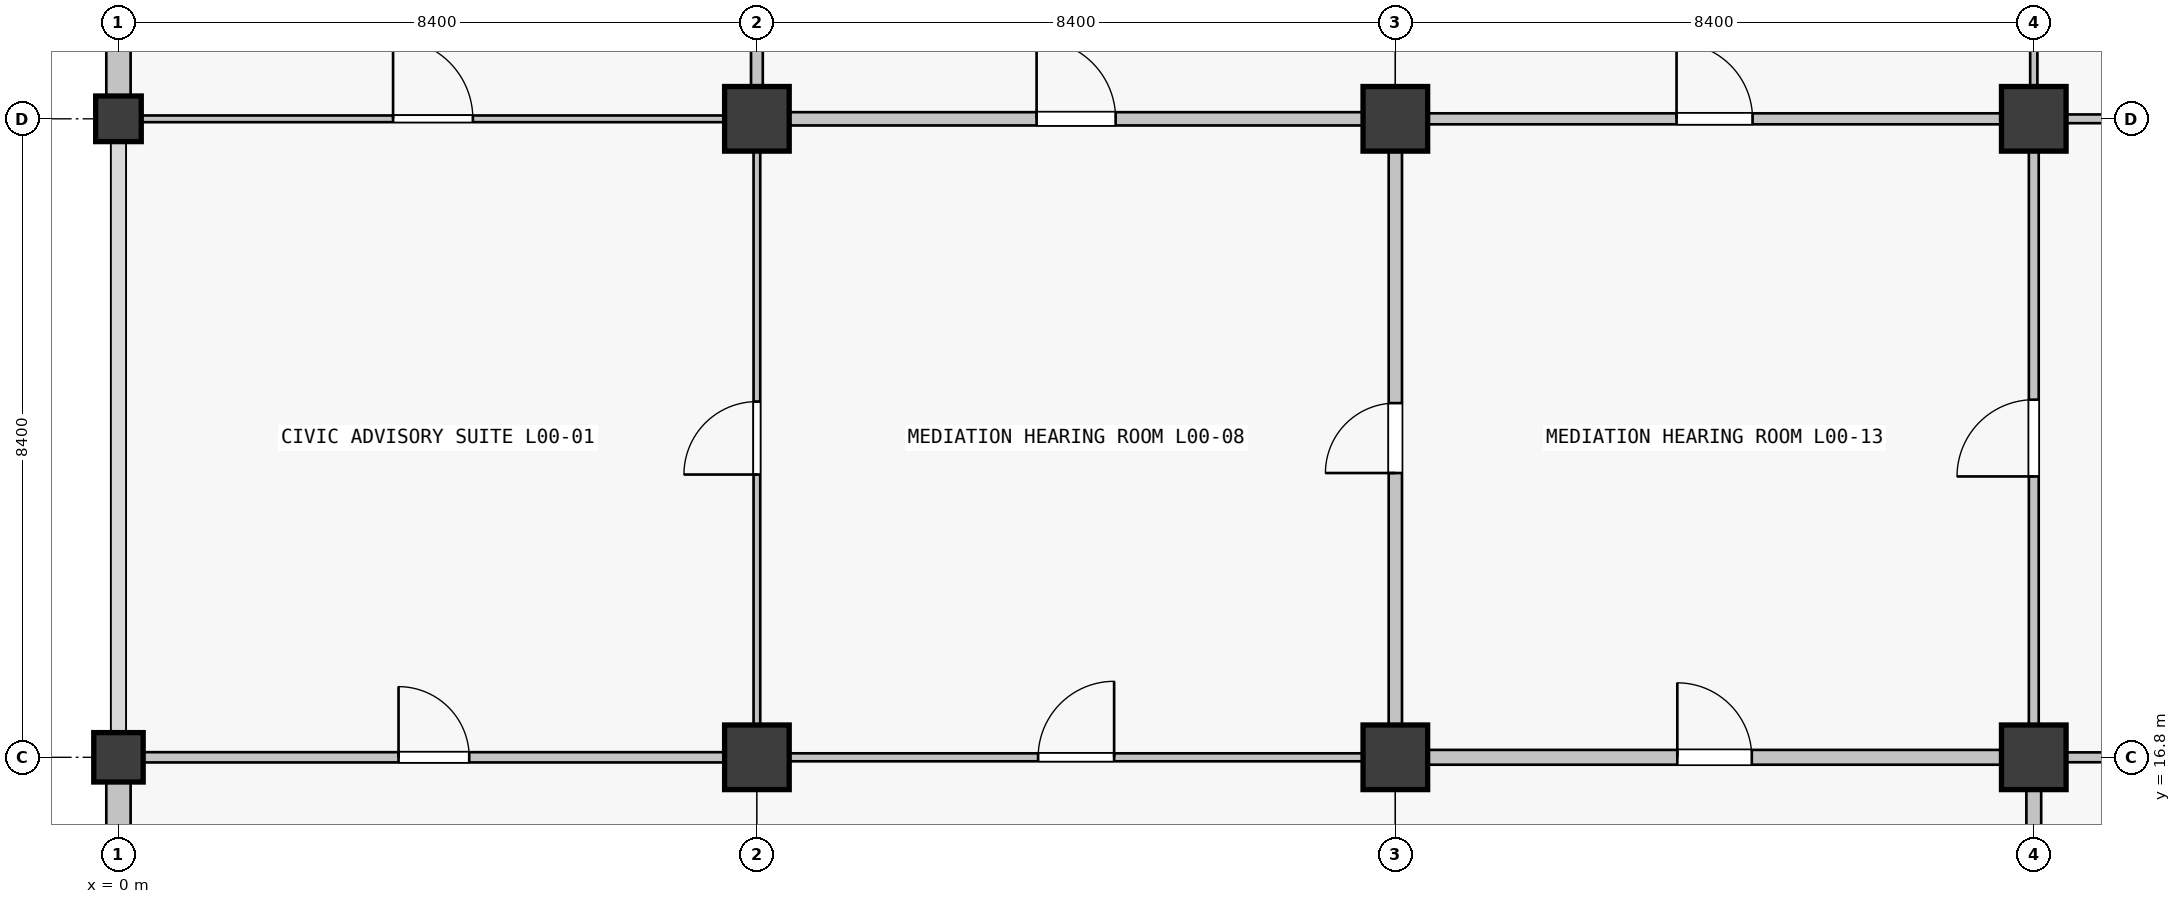
"""IFC4 building model, lengths in metres.
Left out: names, types, materials, properties, quantities, classifications, styles, units other than length and angle.
Written with IfcOpenShell. Run it as: python <this file> out.ifc"""

import sys

from ifc_helpers import new_model, si_unit, direction, frame, frame_2d, origin, origin_2d, place, context, subcontext, project, spatial, rectangle, extrude, element, fill, save


model = new_model("IFC4")
c1 = context("Model", 3, precision=1e-05, world=origin(), true_north=direction((0.0, 1.0)))
c2 = subcontext(c1, "Body", "Model", "MODEL_VIEW")
j1 = project(units=[si_unit("LENGTHUNIT", "METRE"), si_unit("PLANEANGLEUNIT", "RADIAN")], contexts=[c1])
p1 = place(None, origin())
s1 = spatial("IfcSite", under=j1, at=p1, CompositionType="ELEMENT")
p2 = place(p1, origin())
s2 = spatial("IfcBuilding", under=s1, at=p2, CompositionType="ELEMENT")
p3 = place(p2, origin())
s3 = spatial("IfcBuildingStorey", under=s2, at=p3, CompositionType="ELEMENT", Elevation=0.0)
p4 = place(p3, frame((0.0, 16.8, 0.0), z_axis=(0.0, 0.0, 1.0), x_axis=(1.0, 0.0, 0.0)))
e1 = element("IfcColumn", 1, at=p4, inside=s3, PredefinedType="COLUMN", context=c2, shape_type="SweptSolid", body=[
    extrude(rectangle(XDim=0.65, YDim=0.65, at=origin_2d()), origin(), (0.0, 0.0, 1.0), 5.76),
])
p5 = place(p3, frame((0.0, 25.2, 0.0), z_axis=(0.0, 0.0, 1.0), x_axis=(1.0, 0.0, 0.0)))
e2 = element("IfcColumn", 2, at=p5, inside=s3, PredefinedType="COLUMN", context=c2, shape_type="SweptSolid", body=[
    extrude(rectangle(XDim=0.6, YDim=0.6, at=origin_2d()), origin(), (0.0, 0.0, 1.0), 5.76),
])
for number, where, z_axis, x_axis in (
    (3, (8.4, 16.8, 0.0), (0.0, 0.0, 1.0), (1.0, 0.0, 0.0)),
    (4, (8.4, 25.2, 0.0), (0.0, 0.0, 1.0), (1.0, 0.0, 0.0)),
    (5, (16.8, 16.8, 0.0), (0.0, 0.0, 1.0), (1.0, 0.0, 0.0)),
    (6, (16.8, 25.2, 0.0), (0.0, 0.0, 1.0), (1.0, 0.0, 0.0)),
    (7, (25.2, 16.8, 0.0), (0.0, 0.0, 1.0), (1.0, 0.0, 0.0)),
    (8, (25.2, 25.2, 0.0), (0.0, 0.0, 1.0), (1.0, 0.0, 0.0)),
):
    element("IfcColumn", number, at=place(p3, frame(where, z_axis=z_axis, x_axis=x_axis)), inside=s3, PredefinedType="COLUMN", context=c2, shape_type="SweptSolid", body=[
        extrude(rectangle(XDim=0.85, YDim=0.85, at=origin_2d()), origin(), (0.0, 0.0, 1.0), 5.76),
    ])
p6 = place(p3, frame((0.0, 8.701, 0.0), z_axis=(0.0, 0.0, 1.0), x_axis=(0.0, 1.0, 0.0)))
e9 = element("IfcWall", 9, at=p6, inside=s3, PredefinedType="SOLIDWALL", context=c2, shape_type="SweptSolid", body=[
    extrude(rectangle(XDim=7.773, YDim=0.32, at=frame_2d((3.887, 0.0))), origin(), (0.0, 0.0, 1.0), 4.7),
])
p7 = place(p6, frame((2.837, 0.0, 0.9)))
e10 = element("IfcOpeningElement", 10, at=p7, cuts=e9, PredefinedType="OPENING", context=c2, shape_type="SweptSolid", body=[
    extrude(rectangle(XDim=2.1, YDim=1.8, at=frame_2d((1.05, 0.9))), frame((0.0, 0.16, 0.0), z_axis=(0.0, -1.0, 0.0), x_axis=(1.0, 0.0, 0.0)), (0.0, 0.0, 1.0), 0.32),
])
p8 = place(p3, frame((0.0, 25.501, 0.0), z_axis=(0.0, 0.0, 1.0), x_axis=(0.0, 1.0, 0.0)))
e11 = element("IfcWall", 11, at=p8, inside=s3, PredefinedType="SOLIDWALL", context=c2, shape_type="SweptSolid", body=[
    extrude(rectangle(XDim=7.773, YDim=0.32, at=frame_2d((3.886, 0.0))), origin(), (0.0, 0.0, 1.0), 4.7),
])
p9 = place(p8, frame((2.786, 0.0, 0.0)))
e12 = element("IfcOpeningElement", 12, at=p9, cuts=e11, PredefinedType="OPENING", context=c2, shape_type="SweptSolid", body=[
    extrude(rectangle(XDim=2.2, YDim=2.3, at=frame_2d((1.1, 1.15))), frame((0.0, 0.16, 0.0), z_axis=(0.0, -1.0, 0.0), x_axis=(1.0, 0.0, 0.0)), (0.0, 0.0, 1.0), 0.32),
])
p10 = place(p3, frame((0.327, 16.8, 0.0), z_axis=(0.0, 0.0, 1.0), x_axis=(1.0, 0.0, 0.0)))
e13 = element("IfcWall", 13, at=p10, inside=s3, PredefinedType="PARTITIONING", context=c2, shape_type="SweptSolid", body=[
    extrude(rectangle(XDim=7.646, YDim=0.135, at=frame_2d((3.823, 0.0))), origin(), (0.0, 0.0, 1.0), 3.66),
])
p11 = place(p10, frame((3.358, 0.0, 0.0)))
e14 = element("IfcOpeningElement", 14, at=p11, cuts=e13, PredefinedType="OPENING", context=c2, shape_type="SweptSolid", body=[
    extrude(rectangle(XDim=0.93, YDim=2.12, at=frame_2d((0.465, 1.06))), frame((0.0, 0.067, 0.0), z_axis=(0.0, -1.0, 0.0), x_axis=(1.0, 0.0, 0.0)), (0.0, 0.0, 1.0), 0.135),
])
p12 = place(p3, frame((0.302, 25.2, 0.0), z_axis=(0.0, 0.0, 1.0), x_axis=(1.0, 0.0, 0.0)))
e15 = element("IfcWall", 15, at=p12, inside=s3, PredefinedType="PARTITIONING", context=c2, shape_type="SweptSolid", body=[
    extrude(rectangle(XDim=7.671, YDim=0.088, at=frame_2d((3.835, 0.0))), origin(), (0.0, 0.0, 1.0), 3.66),
])
p13 = place(p12, frame((3.311, 0.0, 0.0)))
e16 = element("IfcOpeningElement", 16, at=p13, cuts=e15, PredefinedType="OPENING", context=c2, shape_type="SweptSolid", body=[
    extrude(rectangle(XDim=1.05, YDim=2.12, at=frame_2d((0.525, 1.06))), frame((0.0, 0.044, 0.0), z_axis=(0.0, -1.0, 0.0), x_axis=(1.0, 0.0, 0.0)), (0.0, 0.0, 1.0), 0.088),
])
p14 = place(p3, frame((8.827, 16.8, 0.0), z_axis=(0.0, 0.0, 1.0), x_axis=(1.0, 0.0, 0.0)))
e17 = element("IfcWall", 17, at=p14, inside=s3, PredefinedType="PARTITIONING", context=c2, shape_type="SweptSolid", body=[
    extrude(rectangle(XDim=7.546, YDim=0.105, at=frame_2d((3.773, 0.0))), origin(), (0.0, 0.0, 1.0), 3.66),
])
p15 = place(p14, frame((3.273, 0.0, 0.0)))
e18 = element("IfcOpeningElement", 18, at=p15, cuts=e17, PredefinedType="OPENING", context=c2, shape_type="SweptSolid", body=[
    extrude(rectangle(XDim=1.0, YDim=2.2, at=frame_2d((0.5, 1.1))), frame((0.0, 0.052, 0.0), z_axis=(0.0, -1.0, 0.0), x_axis=(1.0, 0.0, 0.0)), (0.0, 0.0, 1.0), 0.105),
])
p16 = place(p3, frame((8.827, 25.2, 0.0), z_axis=(0.0, 0.0, 1.0), x_axis=(1.0, 0.0, 0.0)))
e19 = element("IfcWall", 19, at=p16, inside=s3, PredefinedType="PARTITIONING", context=c2, shape_type="SweptSolid", body=[
    extrude(rectangle(XDim=7.546, YDim=0.175, at=frame_2d((3.773, 0.0))), origin(), (0.0, 0.0, 1.0), 3.66),
])
p17 = place(p16, frame((3.253, 0.0, 0.0)))
e20 = element("IfcOpeningElement", 20, at=p17, cuts=e19, PredefinedType="OPENING", context=c2, shape_type="SweptSolid", body=[
    extrude(rectangle(XDim=1.04, YDim=2.2, at=frame_2d((0.52, 1.1))), frame((0.0, 0.087, 0.0), z_axis=(0.0, -1.0, 0.0), x_axis=(1.0, 0.0, 0.0)), (0.0, 0.0, 1.0), 0.175),
])
p18 = place(p3, frame((17.227, 16.8, 0.0), z_axis=(0.0, 0.0, 1.0), x_axis=(1.0, 0.0, 0.0)))
e21 = element("IfcWall", 21, at=p18, inside=s3, PredefinedType="PARTITIONING", context=c2, shape_type="SweptSolid", body=[
    extrude(rectangle(XDim=7.546, YDim=0.195, at=frame_2d((3.773, 0.0))), origin(), (0.0, 0.0, 1.0), 3.66),
])
p19 = place(p18, frame((3.283, 0.0, 0.0)))
e22 = element("IfcOpeningElement", 22, at=p19, cuts=e21, PredefinedType="OPENING", context=c2, shape_type="SweptSolid", body=[
    extrude(rectangle(XDim=0.98, YDim=2.18, at=frame_2d((0.49, 1.09))), frame((0.0, 0.098, 0.0), z_axis=(0.0, -1.0, 0.0), x_axis=(1.0, 0.0, 0.0)), (0.0, 0.0, 1.0), 0.195),
])
p20 = place(p3, frame((17.227, 25.2, 0.0), z_axis=(0.0, 0.0, 1.0), x_axis=(1.0, 0.0, 0.0)))
e23 = element("IfcWall", 23, at=p20, inside=s3, PredefinedType="PARTITIONING", context=c2, shape_type="SweptSolid", body=[
    extrude(rectangle(XDim=7.546, YDim=0.145, at=frame_2d((3.773, 0.0))), origin(), (0.0, 0.0, 1.0), 3.66),
])
p21 = place(p20, frame((3.273, 0.0, 0.0)))
e24 = element("IfcOpeningElement", 24, at=p21, cuts=e23, PredefinedType="OPENING", context=c2, shape_type="SweptSolid", body=[
    extrude(rectangle(XDim=1.0, YDim=2.2, at=frame_2d((0.5, 1.1))), frame((0.0, 0.073, 0.0), z_axis=(0.0, -1.0, 0.0), x_axis=(1.0, 0.0, 0.0)), (0.0, 0.0, 1.0), 0.145),
])
p22 = place(p3, frame((25.627, 16.8, 0.0), z_axis=(0.0, 0.0, 1.0), x_axis=(1.0, 0.0, 0.0)))
e25 = element("IfcWall", 25, at=p22, inside=s3, PredefinedType="MOVABLE", context=c2, shape_type="SweptSolid", body=[
    extrude(rectangle(XDim=7.546, YDim=0.13, at=frame_2d((3.773, 0.0))), origin(), (0.0, 0.0, 1.0), 3.66),
])
p23 = place(p22, frame((3.303, 0.0, 0.0)))
e26 = element("IfcOpeningElement", 26, at=p23, cuts=e25, PredefinedType="OPENING", context=c2, shape_type="SweptSolid", body=[
    extrude(rectangle(XDim=0.94, YDim=2.15, at=frame_2d((0.47, 1.075))), frame((0.0, 0.065, 0.0), z_axis=(0.0, -1.0, 0.0), x_axis=(1.0, 0.0, 0.0)), (0.0, 0.0, 1.0), 0.13),
])
p24 = place(p3, frame((25.627, 25.2, 0.0), z_axis=(0.0, 0.0, 1.0), x_axis=(1.0, 0.0, 0.0)))
e27 = element("IfcWall", 27, at=p24, inside=s3, PredefinedType="PARTITIONING", context=c2, shape_type="SweptSolid", body=[
    extrude(rectangle(XDim=7.546, YDim=0.115, at=frame_2d((3.773, 0.0))), origin(), (0.0, 0.0, 1.0), 3.66),
])
p25 = place(p24, frame((3.288, 0.0, 0.0)))
e28 = element("IfcOpeningElement", 28, at=p25, cuts=e27, PredefinedType="OPENING", context=c2, shape_type="SweptSolid", body=[
    extrude(rectangle(XDim=0.97, YDim=2.12, at=frame_2d((0.485, 1.06))), frame((0.0, 0.058, 0.0), z_axis=(0.0, -1.0, 0.0), x_axis=(1.0, 0.0, 0.0)), (0.0, 0.0, 1.0), 0.115),
])
p26 = place(p3, frame((8.4, 17.227, 0.0), z_axis=(0.0, 0.0, 1.0), x_axis=(0.0, 1.0, 0.0)))
e29 = element("IfcWall", 29, at=p26, inside=s3, PredefinedType="PARTITIONING", context=c2, shape_type="SweptSolid", body=[
    extrude(rectangle(XDim=7.546, YDim=0.088, at=frame_2d((3.773, 0.0))), origin(), (0.0, 0.0, 1.0), 3.66),
])
p27 = place(p26, frame((3.293, 0.0, 0.0)))
e30 = element("IfcOpeningElement", 30, at=p27, cuts=e29, PredefinedType="OPENING", context=c2, shape_type="SweptSolid", body=[
    extrude(rectangle(XDim=0.96, YDim=2.18, at=frame_2d((0.48, 1.09))), frame((0.0, 0.044, 0.0), z_axis=(0.0, -1.0, 0.0), x_axis=(1.0, 0.0, 0.0)), (0.0, 0.0, 1.0), 0.088),
])
p28 = place(p3, frame((8.4, 25.627, 0.0), z_axis=(0.0, 0.0, 1.0), x_axis=(0.0, 1.0, 0.0)))
e31 = element("IfcWall", 31, at=p28, inside=s3, PredefinedType="PARTITIONING", context=c2, shape_type="SweptSolid", body=[
    extrude(rectangle(XDim=7.546, YDim=0.155, at=frame_2d((3.773, 0.0))), origin(), (0.0, 0.0, 1.0), 3.66),
])
p29 = place(p28, frame((3.253, 0.0, 0.0)))
e32 = element("IfcOpeningElement", 32, at=p29, cuts=e31, PredefinedType="OPENING", context=c2, shape_type="SweptSolid", body=[
    extrude(rectangle(XDim=1.04, YDim=2.2, at=frame_2d((0.52, 1.1))), frame((0.0, 0.078, 0.0), z_axis=(0.0, -1.0, 0.0), x_axis=(1.0, 0.0, 0.0)), (0.0, 0.0, 1.0), 0.155),
])
p30 = place(p3, frame((16.8, 17.227, 0.0), z_axis=(0.0, 0.0, 1.0), x_axis=(0.0, 1.0, 0.0)))
e33 = element("IfcWall", 33, at=p30, inside=s3, PredefinedType="PARTITIONING", context=c2, shape_type="SweptSolid", body=[
    extrude(rectangle(XDim=7.546, YDim=0.175, at=frame_2d((3.773, 0.0))), origin(), (0.0, 0.0, 1.0), 3.66),
])
p31 = place(p30, frame((3.313, 0.0, 0.0)))
e34 = element("IfcOpeningElement", 34, at=p31, cuts=e33, PredefinedType="OPENING", context=c2, shape_type="SweptSolid", body=[
    extrude(rectangle(XDim=0.92, YDim=2.15, at=frame_2d((0.46, 1.075))), frame((0.0, 0.087, 0.0), z_axis=(0.0, -1.0, 0.0), x_axis=(1.0, 0.0, 0.0)), (0.0, 0.0, 1.0), 0.175),
])
p32 = place(p3, frame((25.2, 8.777, 0.0), z_axis=(0.0, 0.0, 1.0), x_axis=(0.0, 1.0, 0.0)))
e35 = element("IfcWall", 35, at=p32, inside=s3, PredefinedType="PARTITIONING", context=c2, shape_type="SweptSolid", body=[
    extrude(rectangle(XDim=7.596, YDim=0.195, at=frame_2d((3.798, 0.0))), origin(), (0.0, 0.0, 1.0), 3.66),
])
p33 = place(p32, frame((3.328, 0.0, 0.0)))
e36 = element("IfcOpeningElement", 36, at=p33, cuts=e35, PredefinedType="OPENING", context=c2, shape_type="SweptSolid", body=[
    extrude(rectangle(XDim=0.94, YDim=2.15, at=frame_2d((0.47, 1.075))), frame((0.0, 0.098, 0.0), z_axis=(0.0, -1.0, 0.0), x_axis=(1.0, 0.0, 0.0)), (0.0, 0.0, 1.0), 0.195),
])
p34 = place(p3, frame((25.2, 17.227, 0.0), z_axis=(0.0, 0.0, 1.0), x_axis=(0.0, 1.0, 0.0)))
e37 = element("IfcWall", 37, at=p34, inside=s3, PredefinedType="MOVABLE", context=c2, shape_type="SweptSolid", body=[
    extrude(rectangle(XDim=7.546, YDim=0.13, at=frame_2d((3.773, 0.0))), origin(), (0.0, 0.0, 1.0), 3.66),
])
p35 = place(p34, frame((3.268, 0.0, 0.0)))
e38 = element("IfcOpeningElement", 38, at=p35, cuts=e37, PredefinedType="OPENING", context=c2, shape_type="SweptSolid", body=[
    extrude(rectangle(XDim=1.01, YDim=2.12, at=frame_2d((0.505, 1.06))), frame((0.0, 0.065, 0.0), z_axis=(0.0, -1.0, 0.0), x_axis=(1.0, 0.0, 0.0)), (0.0, 0.0, 1.0), 0.13),
])
p36 = place(p3, frame((25.2, 25.627, 0.0), z_axis=(0.0, 0.0, 1.0), x_axis=(0.0, 1.0, 0.0)))
e39 = element("IfcWall", 39, at=p36, inside=s3, PredefinedType="PARTITIONING", context=c2, shape_type="SweptSolid", body=[
    extrude(rectangle(XDim=7.546, YDim=0.095, at=frame_2d((3.773, 0.0))), origin(), (0.0, 0.0, 1.0), 3.66),
])
p37 = place(p36, frame((3.283, 0.0, 0.0)))
e40 = element("IfcOpeningElement", 40, at=p37, cuts=e39, PredefinedType="OPENING", context=c2, shape_type="SweptSolid", body=[
    extrude(rectangle(XDim=0.98, YDim=2.18, at=frame_2d((0.49, 1.09))), frame((0.0, 0.047, 0.0), z_axis=(0.0, -1.0, 0.0), x_axis=(1.0, 0.0, 0.0)), (0.0, 0.0, 1.0), 0.095),
])
p38 = place(p17, origin())
e41 = element("IfcDoor", 41, at=p38, inside=s3, OperationType="SINGLE_SWING_LEFT", PredefinedType="DOOR", context=c2, shape_type="SweptSolid", body=[
    extrude(rectangle(XDim=1.04, YDim=2.2, at=frame_2d((0.52, 1.1))), frame((0.0, 0.025, 0.0), z_axis=(0.0, -1.0, 0.0), x_axis=(1.0, 0.0, 0.0)), (0.0, 0.0, 1.0), 0.05),
])
fill(e20, e41)
p39 = place(p21, origin())
e42 = element("IfcDoor", 42, at=p39, inside=s3, OperationType="SINGLE_SWING_LEFT", PredefinedType="DOOR", context=c2, shape_type="SweptSolid", body=[
    extrude(rectangle(XDim=1.0, YDim=2.2, at=frame_2d((0.5, 1.1))), frame((0.0, 0.025, 0.0), z_axis=(0.0, -1.0, 0.0), x_axis=(1.0, 0.0, 0.0)), (0.0, 0.0, 1.0), 0.05),
])
fill(e24, e42)
p40 = place(p11, origin())
e43 = element("IfcDoor", 43, at=p40, inside=s3, OperationType="SINGLE_SWING_LEFT", PredefinedType="DOOR", context=c2, shape_type="SweptSolid", body=[
    extrude(rectangle(XDim=0.93, YDim=2.12, at=frame_2d((0.465, 1.06))), frame((0.0, 0.025, 0.0), z_axis=(0.0, -1.0, 0.0), x_axis=(1.0, 0.0, 0.0)), (0.0, 0.0, 1.0), 0.05),
])
fill(e14, e43)
p41 = place(p15, origin())
e44 = element("IfcDoor", 44, at=p41, inside=s3, OperationType="SINGLE_SWING_RIGHT", PredefinedType="DOOR", context=c2, shape_type="SweptSolid", body=[
    extrude(rectangle(XDim=1.0, YDim=2.2, at=frame_2d((0.5, 1.1))), frame((0.0, 0.025, 0.0), z_axis=(0.0, -1.0, 0.0), x_axis=(1.0, 0.0, 0.0)), (0.0, 0.0, 1.0), 0.05),
])
fill(e18, e44)
p42 = place(p19, origin())
e45 = element("IfcDoor", 45, at=p42, inside=s3, OperationType="SINGLE_SWING_LEFT", PredefinedType="DOOR", context=c2, shape_type="SweptSolid", body=[
    extrude(rectangle(XDim=0.98, YDim=2.18, at=frame_2d((0.49, 1.09))), frame((0.0, 0.025, 0.0), z_axis=(0.0, -1.0, 0.0), x_axis=(1.0, 0.0, 0.0)), (0.0, 0.0, 1.0), 0.05),
])
fill(e22, e45)
p43 = place(p13, origin())
e46 = element("IfcDoor", 46, at=p43, inside=s3, OperationType="SINGLE_SWING_LEFT", PredefinedType="DOOR", context=c2, shape_type="SweptSolid", body=[
    extrude(rectangle(XDim=1.05, YDim=2.12, at=frame_2d((0.525, 1.06))), frame((0.0, 0.025, 0.0), z_axis=(0.0, -1.0, 0.0), x_axis=(1.0, 0.0, 0.0)), (0.0, 0.0, 1.0), 0.05),
])
fill(e16, e46)
p44 = place(p27, origin())
e47 = element("IfcDoor", 47, at=p44, inside=s3, OperationType="SINGLE_SWING_LEFT", PredefinedType="DOOR", context=c2, shape_type="SweptSolid", body=[
    extrude(rectangle(XDim=0.96, YDim=2.18, at=frame_2d((0.48, 1.09))), frame((0.0, 0.025, 0.0), z_axis=(0.0, -1.0, 0.0), x_axis=(1.0, 0.0, 0.0)), (0.0, 0.0, 1.0), 0.05),
])
fill(e30, e47)
p45 = place(p31, origin())
e48 = element("IfcDoor", 48, at=p45, inside=s3, OperationType="SINGLE_SWING_LEFT", PredefinedType="DOOR", context=c2, shape_type="SweptSolid", body=[
    extrude(rectangle(XDim=0.92, YDim=2.15, at=frame_2d((0.46, 1.075))), frame((0.0, 0.025, 0.0), z_axis=(0.0, -1.0, 0.0), x_axis=(1.0, 0.0, 0.0)), (0.0, 0.0, 1.0), 0.05),
])
fill(e34, e48)
p46 = place(p35, origin())
e49 = element("IfcDoor", 49, at=p46, inside=s3, OperationType="SINGLE_SWING_LEFT", PredefinedType="DOOR", context=c2, shape_type="SweptSolid", body=[
    extrude(rectangle(XDim=1.01, YDim=2.12, at=frame_2d((0.505, 1.06))), frame((0.0, 0.025, 0.0), z_axis=(0.0, -1.0, 0.0), x_axis=(1.0, 0.0, 0.0)), (0.0, 0.0, 1.0), 0.05),
])
fill(e38, e49)
save(model, sys.argv[1])
